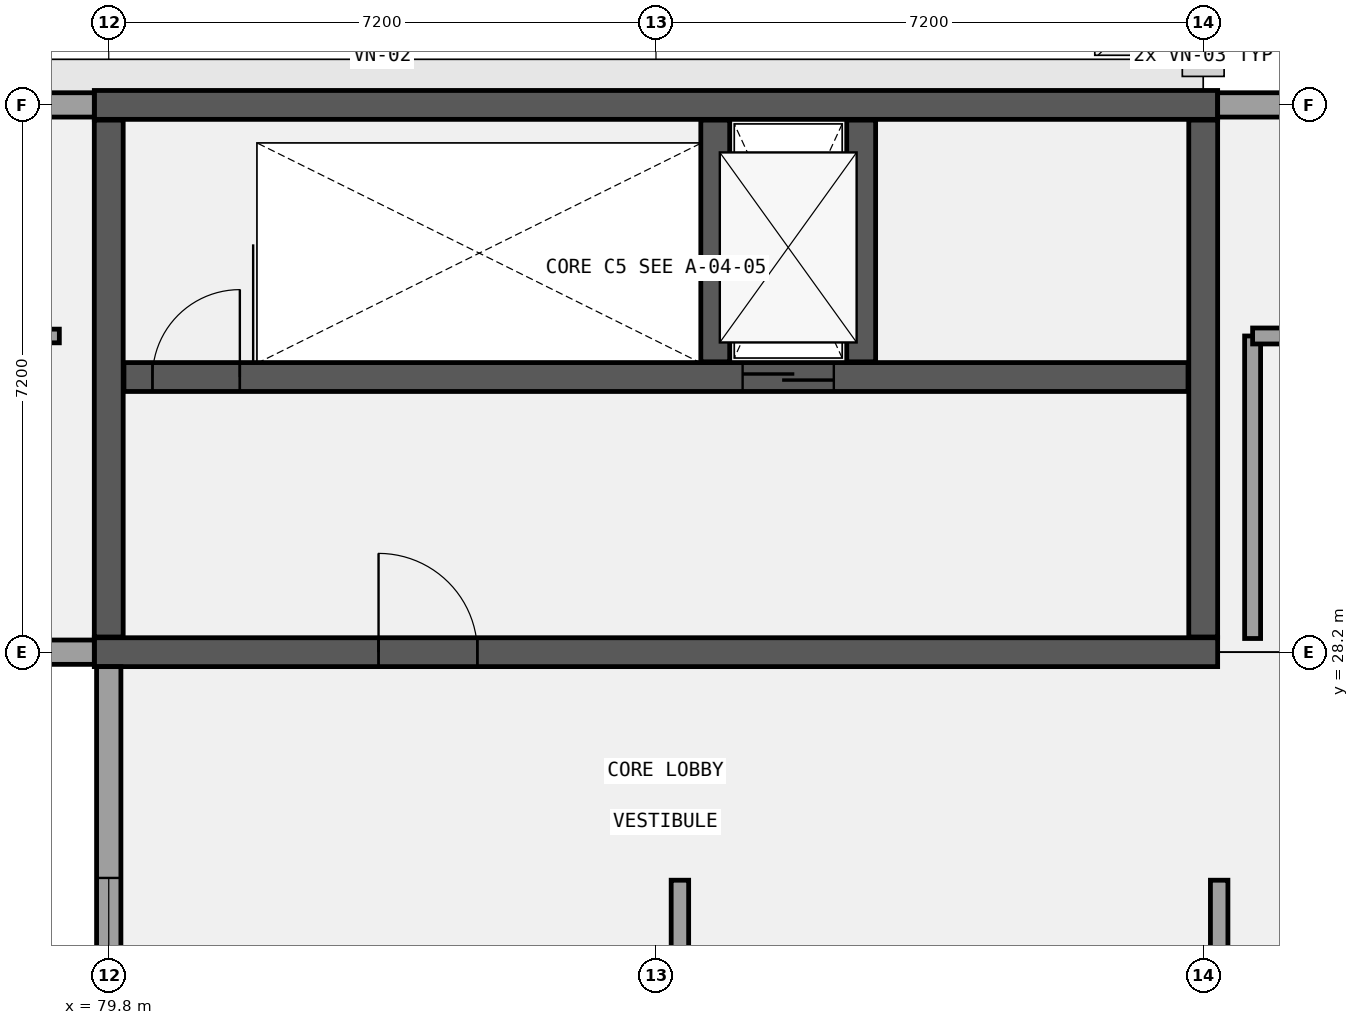
"""IFC4 building model, lengths in metres.
Left out: names, types, materials, properties, quantities, classifications, styles, units other than length and angle.
Written with IfcOpenShell. Run it as: python <this file> out.ifc"""

import sys

from ifc_helpers import new_model, si_unit, direction, frame, frame_2d, origin, place, context, subcontext, project, spatial, rectangle, extrude, element, fill, save


model = new_model("IFC4")
c1 = context("Model", 3, precision=1e-05, world=origin(), true_north=direction((0.0, 1.0)))
c2 = subcontext(c1, "Body", "Model", "MODEL_VIEW")
j1 = project(units=[si_unit("LENGTHUNIT", "METRE"), si_unit("PLANEANGLEUNIT", "RADIAN")], contexts=[c1])
p1 = place(None, origin())
s1 = spatial("IfcSite", under=j1, at=p1, CompositionType="ELEMENT")
p2 = place(p1, origin())
s2 = spatial("IfcBuilding", under=s1, at=p2, CompositionType="ELEMENT")
p3 = place(p2, frame((0.0, 0.0, 9.6)))
s3 = spatial("IfcBuildingStorey", under=s2, at=p3, CompositionType="ELEMENT", Elevation=9.6)
p4 = place(p3, frame((79.61, 35.4, 0.0), z_axis=(0.0, 0.0, 1.0), x_axis=(1.0, 0.0, 0.0)))
e1 = element("IfcWall", 1, at=p4, inside=s3, PredefinedType="SHEAR", context=c2, shape_type="SweptSolid", body=[
    extrude(rectangle(XDim=14.78, YDim=0.38, at=frame_2d((7.39, 0.0))), origin(), (0.0, 0.0, 1.0), 4.2),
])
p5 = place(p3, frame((79.61, 28.2, 0.0), z_axis=(0.0, 0.0, 1.0), x_axis=(1.0, 0.0, 0.0)))
e2 = element("IfcWall", 2, at=p5, inside=s3, PredefinedType="SHEAR", context=c2, shape_type="SweptSolid", body=[
    extrude(rectangle(XDim=14.78, YDim=0.38, at=frame_2d((7.39, 0.0))), origin(), (0.0, 0.0, 1.0), 4.2),
])
p6 = place(p5, frame((3.74, 0.0, 0.0)))
e3 = element("IfcOpeningElement", 3, at=p6, cuts=e2, PredefinedType="OPENING", context=c2, shape_type="SweptSolid", body=[
    extrude(rectangle(XDim=1.3, YDim=2.2, at=frame_2d((0.65, 1.1))), frame((0.0, 0.2, 0.0), z_axis=(0.0, -1.0, 0.0), x_axis=(1.0, 0.0, 0.0)), (0.0, 0.0, 1.0), 0.4),
])
for number, where, z_axis, x_axis in (
    (4, (79.8, 28.4, 0.0), (0.0, 0.0, 1.0), (0.0, 1.0, 0.0)),
    (5, (94.2, 28.4, 0.0), (0.0, 0.0, 1.0), (0.0, 1.0, 0.0)),
):
    element("IfcWall", number, at=place(p3, frame(where, z_axis=z_axis, x_axis=x_axis)), inside=s3, PredefinedType="SHEAR", context=c2, shape_type="SweptSolid", body=[
        extrude(rectangle(XDim=6.8, YDim=0.38, at=frame_2d((3.4, 0.0))), origin(), (0.0, 0.0, 1.0), 4.2),
    ])
p7 = place(p3, frame((80.0, 31.82, 0.0), z_axis=(0.0, 0.0, 1.0), x_axis=(1.0, 0.0, 0.0)))
e6 = element("IfcWall", 6, at=p7, inside=s3, PredefinedType="SHEAR", context=c2, shape_type="SweptSolid", body=[
    extrude(rectangle(XDim=14.0, YDim=0.38, at=frame_2d((7.0, 0.0))), origin(), (0.0, 0.0, 1.0), 4.2),
])
p8 = place(p7, frame((8.14, 0.0, 0.0)))
e7 = element("IfcOpeningElement", 7, at=p8, cuts=e6, PredefinedType="OPENING", context=c2, shape_type="SweptSolid", body=[
    extrude(rectangle(XDim=1.2, YDim=2.15, at=frame_2d((0.6, 1.075))), frame((0.0, 0.2, 0.0), z_axis=(0.0, -1.0, 0.0), x_axis=(1.0, 0.0, 0.0)), (0.0, 0.0, 1.0), 0.4),
])
p9 = place(p7, frame((0.375, 0.0, 0.0)))
e8 = element("IfcOpeningElement", 8, at=p9, cuts=e6, PredefinedType="OPENING", context=c2, shape_type="SweptSolid", body=[
    extrude(rectangle(XDim=1.15, YDim=2.15, at=frame_2d((0.575, 1.075))), frame((0.0, 0.2, 0.0), z_axis=(0.0, -1.0, 0.0), x_axis=(1.0, 0.0, 0.0)), (0.0, 0.0, 1.0), 0.4),
])
for number, where, z_axis, x_axis in (
    (9, (87.78, 32.02, 0.0), (0.0, 0.0, 1.0), (0.0, 1.0, 0.0)),
    (10, (89.7, 32.02, 0.0), (0.0, 0.0, 1.0), (0.0, 1.0, 0.0)),
):
    element("IfcWall", number, at=place(p3, frame(where, z_axis=z_axis, x_axis=x_axis)), inside=s3, PredefinedType="SHEAR", context=c2, shape_type="SweptSolid", body=[
        extrude(rectangle(XDim=3.18, YDim=0.38, at=frame_2d((1.59, 0.0))), origin(), (0.0, 0.0, 1.0), 4.2),
    ])
p10 = place(p3, frame((79.8, 28.01, 0.0), z_axis=(0.0, 0.0, 1.0), x_axis=(0.0, -1.0, 0.0)))
e11 = element("IfcWall", 11, at=p10, inside=s3, PredefinedType="SOLIDWALL", context=c2, shape_type="SweptSolid", body=[
    extrude(rectangle(XDim=21.25, YDim=0.32, at=frame_2d((10.625, 0.0))), origin(), (0.0, 0.0, 1.0), 3.19),
])
p11 = place(p10, frame((17.005, 0.0, 1.0)))
e12 = element("IfcOpeningElement", 12, at=p11, cuts=e11, PredefinedType="OPENING", context=c2, shape_type="SweptSolid", body=[
    extrude(rectangle(XDim=1.45, YDim=1.9, at=frame_2d((0.725, 0.95))), frame((0.0, 0.17, 0.0), z_axis=(0.0, -1.0, 0.0), x_axis=(1.0, 0.0, 0.0)), (0.0, 0.0, 1.0), 0.34),
])
p12 = place(p10, frame((9.885, 0.0, 1.0)))
e13 = element("IfcOpeningElement", 13, at=p12, cuts=e11, PredefinedType="OPENING", context=c2, shape_type="SweptSolid", body=[
    extrude(rectangle(XDim=1.45, YDim=1.9, at=frame_2d((0.725, 0.95))), frame((0.0, 0.17, 0.0), z_axis=(0.0, -1.0, 0.0), x_axis=(1.0, 0.0, 0.0)), (0.0, 0.0, 1.0), 0.34),
])
p13 = place(p10, frame((2.78, 0.0, 1.0)))
e14 = element("IfcOpeningElement", 14, at=p13, cuts=e11, PredefinedType="OPENING", context=c2, shape_type="SweptSolid", body=[
    extrude(rectangle(XDim=1.45, YDim=1.9, at=frame_2d((0.725, 0.95))), frame((0.0, 0.17, 0.0), z_axis=(0.0, -1.0, 0.0), x_axis=(1.0, 0.0, 0.0)), (0.0, 0.0, 1.0), 0.34),
])
p14 = place(p3, frame((29.24, 28.2, 0.0), z_axis=(0.0, 0.0, 1.0), x_axis=(1.0, 0.0, 0.0)))
e15 = element("IfcWall", 15, at=p14, inside=s3, PredefinedType="SOLIDWALL", context=c2, shape_type="SweptSolid", body=[
    extrude(rectangle(XDim=50.37, YDim=0.32, at=frame_2d((25.185, 0.0))), origin(), (0.0, 0.0, 1.0), 2.94),
])
p15 = place(p14, frame((2.86, 0.0, 1.0)))
e16 = element("IfcOpeningElement", 16, at=p15, cuts=e15, PredefinedType="OPENING", context=c2, shape_type="SweptSolid", body=[
    extrude(rectangle(XDim=1.8, YDim=1.65, at=frame_2d((0.9, 0.825))), frame((0.0, 0.17, 0.0), z_axis=(0.0, -1.0, 0.0), x_axis=(1.0, 0.0, 0.0)), (0.0, 0.0, 1.0), 0.34),
])
p16 = place(p14, frame((10.06, 0.0, 1.0)))
e17 = element("IfcOpeningElement", 17, at=p16, cuts=e15, PredefinedType="OPENING", context=c2, shape_type="SweptSolid", body=[
    extrude(rectangle(XDim=1.8, YDim=1.65, at=frame_2d((0.9, 0.825))), frame((0.0, 0.17, 0.0), z_axis=(0.0, -1.0, 0.0), x_axis=(1.0, 0.0, 0.0)), (0.0, 0.0, 1.0), 0.34),
])
p17 = place(p14, frame((17.26, 0.0, 1.0)))
e18 = element("IfcOpeningElement", 18, at=p17, cuts=e15, PredefinedType="OPENING", context=c2, shape_type="SweptSolid", body=[
    extrude(rectangle(XDim=1.8, YDim=1.65, at=frame_2d((0.9, 0.825))), frame((0.0, 0.17, 0.0), z_axis=(0.0, -1.0, 0.0), x_axis=(1.0, 0.0, 0.0)), (0.0, 0.0, 1.0), 0.34),
])
p18 = place(p14, frame((24.46, 0.0, 1.0)))
e19 = element("IfcOpeningElement", 19, at=p18, cuts=e15, PredefinedType="OPENING", context=c2, shape_type="SweptSolid", body=[
    extrude(rectangle(XDim=1.8, YDim=1.65, at=frame_2d((0.9, 0.825))), frame((0.0, 0.17, 0.0), z_axis=(0.0, -1.0, 0.0), x_axis=(1.0, 0.0, 0.0)), (0.0, 0.0, 1.0), 0.34),
])
p19 = place(p14, frame((31.66, 0.0, 1.0)))
e20 = element("IfcOpeningElement", 20, at=p19, cuts=e15, PredefinedType="OPENING", context=c2, shape_type="SweptSolid", body=[
    extrude(rectangle(XDim=1.8, YDim=1.65, at=frame_2d((0.9, 0.825))), frame((0.0, 0.17, 0.0), z_axis=(0.0, -1.0, 0.0), x_axis=(1.0, 0.0, 0.0)), (0.0, 0.0, 1.0), 0.34),
])
p20 = place(p14, frame((38.86, 0.0, 1.0)))
e21 = element("IfcOpeningElement", 21, at=p20, cuts=e15, PredefinedType="OPENING", context=c2, shape_type="SweptSolid", body=[
    extrude(rectangle(XDim=1.8, YDim=1.65, at=frame_2d((0.9, 0.825))), frame((0.0, 0.17, 0.0), z_axis=(0.0, -1.0, 0.0), x_axis=(1.0, 0.0, 0.0)), (0.0, 0.0, 1.0), 0.34),
])
p21 = place(p14, frame((45.965, 0.0, 1.0)))
e22 = element("IfcOpeningElement", 22, at=p21, cuts=e15, PredefinedType="OPENING", context=c2, shape_type="SweptSolid", body=[
    extrude(rectangle(XDim=1.8, YDim=1.65, at=frame_2d((0.9, 0.825))), frame((0.0, 0.17, 0.0), z_axis=(0.0, -1.0, 0.0), x_axis=(1.0, 0.0, 0.0)), (0.0, 0.0, 1.0), 0.34),
])
p22 = place(p3, frame((144.76, 35.4, 0.0), z_axis=(0.0, 0.0, 1.0), x_axis=(-1.0, 0.0, 0.0)))
e23 = element("IfcWall", 23, at=p22, inside=s3, PredefinedType="SOLIDWALL", context=c2, shape_type="SweptSolid", body=[
    extrude(rectangle(XDim=50.37, YDim=0.32, at=frame_2d((25.185, 0.0))), origin(), (0.0, 0.0, 1.0), 2.94),
])
p23 = place(p22, frame((46.29, 0.0, 1.0)))
e24 = element("IfcOpeningElement", 24, at=p23, cuts=e23, PredefinedType="OPENING", context=c2, shape_type="SweptSolid", body=[
    extrude(rectangle(XDim=1.15, YDim=1.4, at=frame_2d((0.575, 0.7))), frame((0.0, 0.17, 0.0), z_axis=(0.0, -1.0, 0.0), x_axis=(1.0, 0.0, 0.0)), (0.0, 0.0, 1.0), 0.34),
])
p24 = place(p22, frame((39.185, 0.0, 1.0)))
e25 = element("IfcOpeningElement", 25, at=p24, cuts=e23, PredefinedType="OPENING", context=c2, shape_type="SweptSolid", body=[
    extrude(rectangle(XDim=1.15, YDim=1.4, at=frame_2d((0.575, 0.7))), frame((0.0, 0.17, 0.0), z_axis=(0.0, -1.0, 0.0), x_axis=(1.0, 0.0, 0.0)), (0.0, 0.0, 1.0), 0.34),
])
p25 = place(p22, frame((31.985, 0.0, 1.0)))
e26 = element("IfcOpeningElement", 26, at=p25, cuts=e23, PredefinedType="OPENING", context=c2, shape_type="SweptSolid", body=[
    extrude(rectangle(XDim=1.15, YDim=1.4, at=frame_2d((0.575, 0.7))), frame((0.0, 0.17, 0.0), z_axis=(0.0, -1.0, 0.0), x_axis=(1.0, 0.0, 0.0)), (0.0, 0.0, 1.0), 0.34),
])
p26 = place(p22, frame((24.785, 0.0, 1.0)))
e27 = element("IfcOpeningElement", 27, at=p26, cuts=e23, PredefinedType="OPENING", context=c2, shape_type="SweptSolid", body=[
    extrude(rectangle(XDim=1.15, YDim=1.4, at=frame_2d((0.575, 0.7))), frame((0.0, 0.17, 0.0), z_axis=(0.0, -1.0, 0.0), x_axis=(1.0, 0.0, 0.0)), (0.0, 0.0, 1.0), 0.34),
])
p27 = place(p22, frame((17.585, 0.0, 1.0)))
e28 = element("IfcOpeningElement", 28, at=p27, cuts=e23, PredefinedType="OPENING", context=c2, shape_type="SweptSolid", body=[
    extrude(rectangle(XDim=1.15, YDim=1.4, at=frame_2d((0.575, 0.7))), frame((0.0, 0.17, 0.0), z_axis=(0.0, -1.0, 0.0), x_axis=(1.0, 0.0, 0.0)), (0.0, 0.0, 1.0), 0.34),
])
p28 = place(p22, frame((10.385, 0.0, 1.0)))
e29 = element("IfcOpeningElement", 29, at=p28, cuts=e23, PredefinedType="OPENING", context=c2, shape_type="SweptSolid", body=[
    extrude(rectangle(XDim=1.15, YDim=1.4, at=frame_2d((0.575, 0.7))), frame((0.0, 0.17, 0.0), z_axis=(0.0, -1.0, 0.0), x_axis=(1.0, 0.0, 0.0)), (0.0, 0.0, 1.0), 0.34),
])
p29 = place(p22, frame((3.185, 0.0, 1.0)))
e30 = element("IfcOpeningElement", 30, at=p29, cuts=e23, PredefinedType="OPENING", context=c2, shape_type="SweptSolid", body=[
    extrude(rectangle(XDim=1.15, YDim=1.4, at=frame_2d((0.575, 0.7))), frame((0.0, 0.17, 0.0), z_axis=(0.0, -1.0, 0.0), x_axis=(1.0, 0.0, 0.0)), (0.0, 0.0, 1.0), 0.34),
])
p30 = place(p3, frame((79.61, 35.4, 0.0), z_axis=(0.0, 0.0, 1.0), x_axis=(-1.0, 0.0, 0.0)))
e31 = element("IfcWall", 31, at=p30, inside=s3, PredefinedType="SOLIDWALL", context=c2, shape_type="SweptSolid", body=[
    extrude(rectangle(XDim=50.37, YDim=0.32, at=frame_2d((25.185, 0.0))), origin(), (0.0, 0.0, 1.0), 2.94),
])
p31 = place(p30, frame((46.035, 0.0, 1.0)))
e32 = element("IfcOpeningElement", 32, at=p31, cuts=e31, PredefinedType="OPENING", context=c2, shape_type="SweptSolid", body=[
    extrude(rectangle(XDim=1.15, YDim=1.4, at=frame_2d((0.575, 0.7))), frame((0.0, 0.17, 0.0), z_axis=(0.0, -1.0, 0.0), x_axis=(1.0, 0.0, 0.0)), (0.0, 0.0, 1.0), 0.34),
])
p32 = place(p30, frame((38.835, 0.0, 1.0)))
e33 = element("IfcOpeningElement", 33, at=p32, cuts=e31, PredefinedType="OPENING", context=c2, shape_type="SweptSolid", body=[
    extrude(rectangle(XDim=1.15, YDim=1.4, at=frame_2d((0.575, 0.7))), frame((0.0, 0.17, 0.0), z_axis=(0.0, -1.0, 0.0), x_axis=(1.0, 0.0, 0.0)), (0.0, 0.0, 1.0), 0.34),
])
p33 = place(p30, frame((31.635, 0.0, 1.0)))
e34 = element("IfcOpeningElement", 34, at=p33, cuts=e31, PredefinedType="OPENING", context=c2, shape_type="SweptSolid", body=[
    extrude(rectangle(XDim=1.15, YDim=1.4, at=frame_2d((0.575, 0.7))), frame((0.0, 0.17, 0.0), z_axis=(0.0, -1.0, 0.0), x_axis=(1.0, 0.0, 0.0)), (0.0, 0.0, 1.0), 0.34),
])
p34 = place(p30, frame((24.435, 0.0, 1.0)))
e35 = element("IfcOpeningElement", 35, at=p34, cuts=e31, PredefinedType="OPENING", context=c2, shape_type="SweptSolid", body=[
    extrude(rectangle(XDim=1.15, YDim=1.4, at=frame_2d((0.575, 0.7))), frame((0.0, 0.17, 0.0), z_axis=(0.0, -1.0, 0.0), x_axis=(1.0, 0.0, 0.0)), (0.0, 0.0, 1.0), 0.34),
])
p35 = place(p30, frame((17.235, 0.0, 1.0)))
e36 = element("IfcOpeningElement", 36, at=p35, cuts=e31, PredefinedType="OPENING", context=c2, shape_type="SweptSolid", body=[
    extrude(rectangle(XDim=1.15, YDim=1.4, at=frame_2d((0.575, 0.7))), frame((0.0, 0.17, 0.0), z_axis=(0.0, -1.0, 0.0), x_axis=(1.0, 0.0, 0.0)), (0.0, 0.0, 1.0), 0.34),
])
p36 = place(p30, frame((10.035, 0.0, 1.0)))
e37 = element("IfcOpeningElement", 37, at=p36, cuts=e31, PredefinedType="OPENING", context=c2, shape_type="SweptSolid", body=[
    extrude(rectangle(XDim=1.15, YDim=1.4, at=frame_2d((0.575, 0.7))), frame((0.0, 0.17, 0.0), z_axis=(0.0, -1.0, 0.0), x_axis=(1.0, 0.0, 0.0)), (0.0, 0.0, 1.0), 0.34),
])
p37 = place(p30, frame((2.93, 0.0, 1.0)))
e38 = element("IfcOpeningElement", 38, at=p37, cuts=e31, PredefinedType="OPENING", context=c2, shape_type="SweptSolid", body=[
    extrude(rectangle(XDim=1.15, YDim=1.4, at=frame_2d((0.575, 0.7))), frame((0.0, 0.17, 0.0), z_axis=(0.0, -1.0, 0.0), x_axis=(1.0, 0.0, 0.0)), (0.0, 0.0, 1.0), 0.34),
])
p38 = place(p3, frame((69.284, 32.36, 0.0), z_axis=(0.0, 0.0, 1.0), x_axis=(1.0, 0.0, 0.0)))
e39 = element("IfcWall", 39, at=p38, inside=s3, PredefinedType="PARTITIONING", context=c2, shape_type="SweptSolid", body=[
    extrude(rectangle(XDim=9.866, YDim=0.18, at=frame_2d((4.933, 0.0))), origin(), (0.0, 0.0, 1.0), 3.94),
])
p39 = place(p38, frame((4.473, 0.0, 0.0)))
e40 = element("IfcOpeningElement", 40, at=p39, cuts=e39, PredefinedType="OPENING", context=c2, shape_type="SweptSolid", body=[
    extrude(rectangle(XDim=0.92, YDim=2.22, at=frame_2d((0.46, 1.11))), frame((0.0, 0.1, 0.0), z_axis=(0.0, -1.0, 0.0), x_axis=(1.0, 0.0, 0.0)), (0.0, 0.0, 1.0), 0.2),
])
p40 = place(p3, frame((94.85, 28.38, 0.0), z_axis=(0.0, 0.0, 1.0), x_axis=(0.0, 1.0, 0.0)))
e41 = element("IfcWall", 41, at=p40, inside=s3, PredefinedType="PARTITIONING", context=c2, shape_type="SweptSolid", body=[
    extrude(rectangle(XDim=3.98, YDim=0.21, at=frame_2d((1.99, 0.0))), origin(), (0.0, 0.0, 1.0), 3.94),
])
p41 = place(p3, frame((94.85, 32.36, 0.0), z_axis=(0.0, 0.0, 1.0), x_axis=(1.0, 0.0, 0.0)))
e42 = element("IfcWall", 42, at=p41, inside=s3, PredefinedType="PARTITIONING", context=c2, shape_type="SweptSolid", body=[
    extrude(rectangle(XDim=9.866, YDim=0.21, at=frame_2d((4.933, 0.0))), origin(), (0.0, 0.0, 1.0), 3.94),
])
p42 = place(p41, frame((4.473, 0.0, 0.0)))
e43 = element("IfcOpeningElement", 43, at=p42, cuts=e42, PredefinedType="OPENING", context=c2, shape_type="SweptSolid", body=[
    extrude(rectangle(XDim=0.92, YDim=2.35, at=frame_2d((0.46, 1.175))), frame((0.0, 0.115, 0.0), z_axis=(0.0, -1.0, 0.0), x_axis=(1.0, 0.0, 0.0)), (0.0, 0.0, 1.0), 0.23),
])
p43 = place(p3, frame((87.315, 17.28, 0.0), z_axis=(0.0, 0.0, 1.0), x_axis=(0.0, 1.0, 0.0)))
e44 = element("IfcWall", 44, at=p43, inside=s3, PredefinedType="PARTITIONING", context=c2, shape_type="SweptSolid", body=[
    extrude(rectangle(XDim=7.92, YDim=0.23, at=frame_2d((3.96, 0.0))), origin(), (0.0, 0.0, 1.0), 3.19),
])
p44 = place(p3, frame((94.41, 17.28, 0.0), z_axis=(0.0, 0.0, 1.0), x_axis=(0.0, 1.0, 0.0)))
e45 = element("IfcWall", 45, at=p44, inside=s3, PredefinedType="PARTITIONING", context=c2, shape_type="SweptSolid", body=[
    extrude(rectangle(XDim=7.92, YDim=0.23, at=frame_2d((3.96, 0.0))), origin(), (0.0, 0.0, 1.0), 3.14),
])
p45 = place(p8, frame((1.2, 0.0, 0.0), z_axis=(0.0, 0.0, 1.0), x_axis=(-1.0, 0.0, 0.0)))
e46 = element("IfcDoor", 46, at=p45, inside=s3, OperationType="DOUBLE_DOOR_SLIDING", PredefinedType="DOOR", context=c2, shape_type="SweptSolid", body=[
    extrude(rectangle(XDim=1.2, YDim=2.15, at=frame_2d((0.6, 1.075))), frame((0.0, 0.025, 0.0), z_axis=(0.0, -1.0, 0.0), x_axis=(1.0, 0.0, 0.0)), (0.0, 0.0, 1.0), 0.05),
])
fill(e7, e46)
p46 = place(p9, origin())
e47 = element("IfcDoor", 47, at=p46, inside=s3, OperationType="SINGLE_SWING_RIGHT", PredefinedType="DOOR", context=c2, shape_type="SweptSolid", body=[
    extrude(rectangle(XDim=1.15, YDim=2.15, at=frame_2d((0.575, 1.075))), frame((0.0, 0.025, 0.0), z_axis=(0.0, -1.0, 0.0), x_axis=(1.0, 0.0, 0.0)), (0.0, 0.0, 1.0), 0.05),
])
fill(e8, e47)
p47 = place(p6, frame((1.3, 0.0, 0.0), z_axis=(0.0, 0.0, 1.0), x_axis=(-1.0, 0.0, 0.0)))
e48 = element("IfcDoor", 48, at=p47, inside=s3, OperationType="SINGLE_SWING_LEFT", PredefinedType="DOOR", context=c2, shape_type="SweptSolid", body=[
    extrude(rectangle(XDim=1.3, YDim=2.2, at=frame_2d((0.65, 1.1))), frame((0.0, 0.025, 0.0), z_axis=(0.0, -1.0, 0.0), x_axis=(1.0, 0.0, 0.0)), (0.0, 0.0, 1.0), 0.05),
])
fill(e3, e48)
p48 = place(p13, origin())
e49 = element("IfcWindow", 49, at=p48, inside=s3, PartitioningType="SINGLE_PANEL", PredefinedType="WINDOW", context=c2, shape_type="SweptSolid", body=[
    extrude(rectangle(XDim=1.45, YDim=1.9, at=frame_2d((0.725, 0.95))), frame((0.0, 0.03, 0.0), z_axis=(0.0, -1.0, 0.0), x_axis=(1.0, 0.0, 0.0)), (0.0, 0.0, 1.0), 0.06),
])
fill(e14, e49)
save(model, sys.argv[1])
